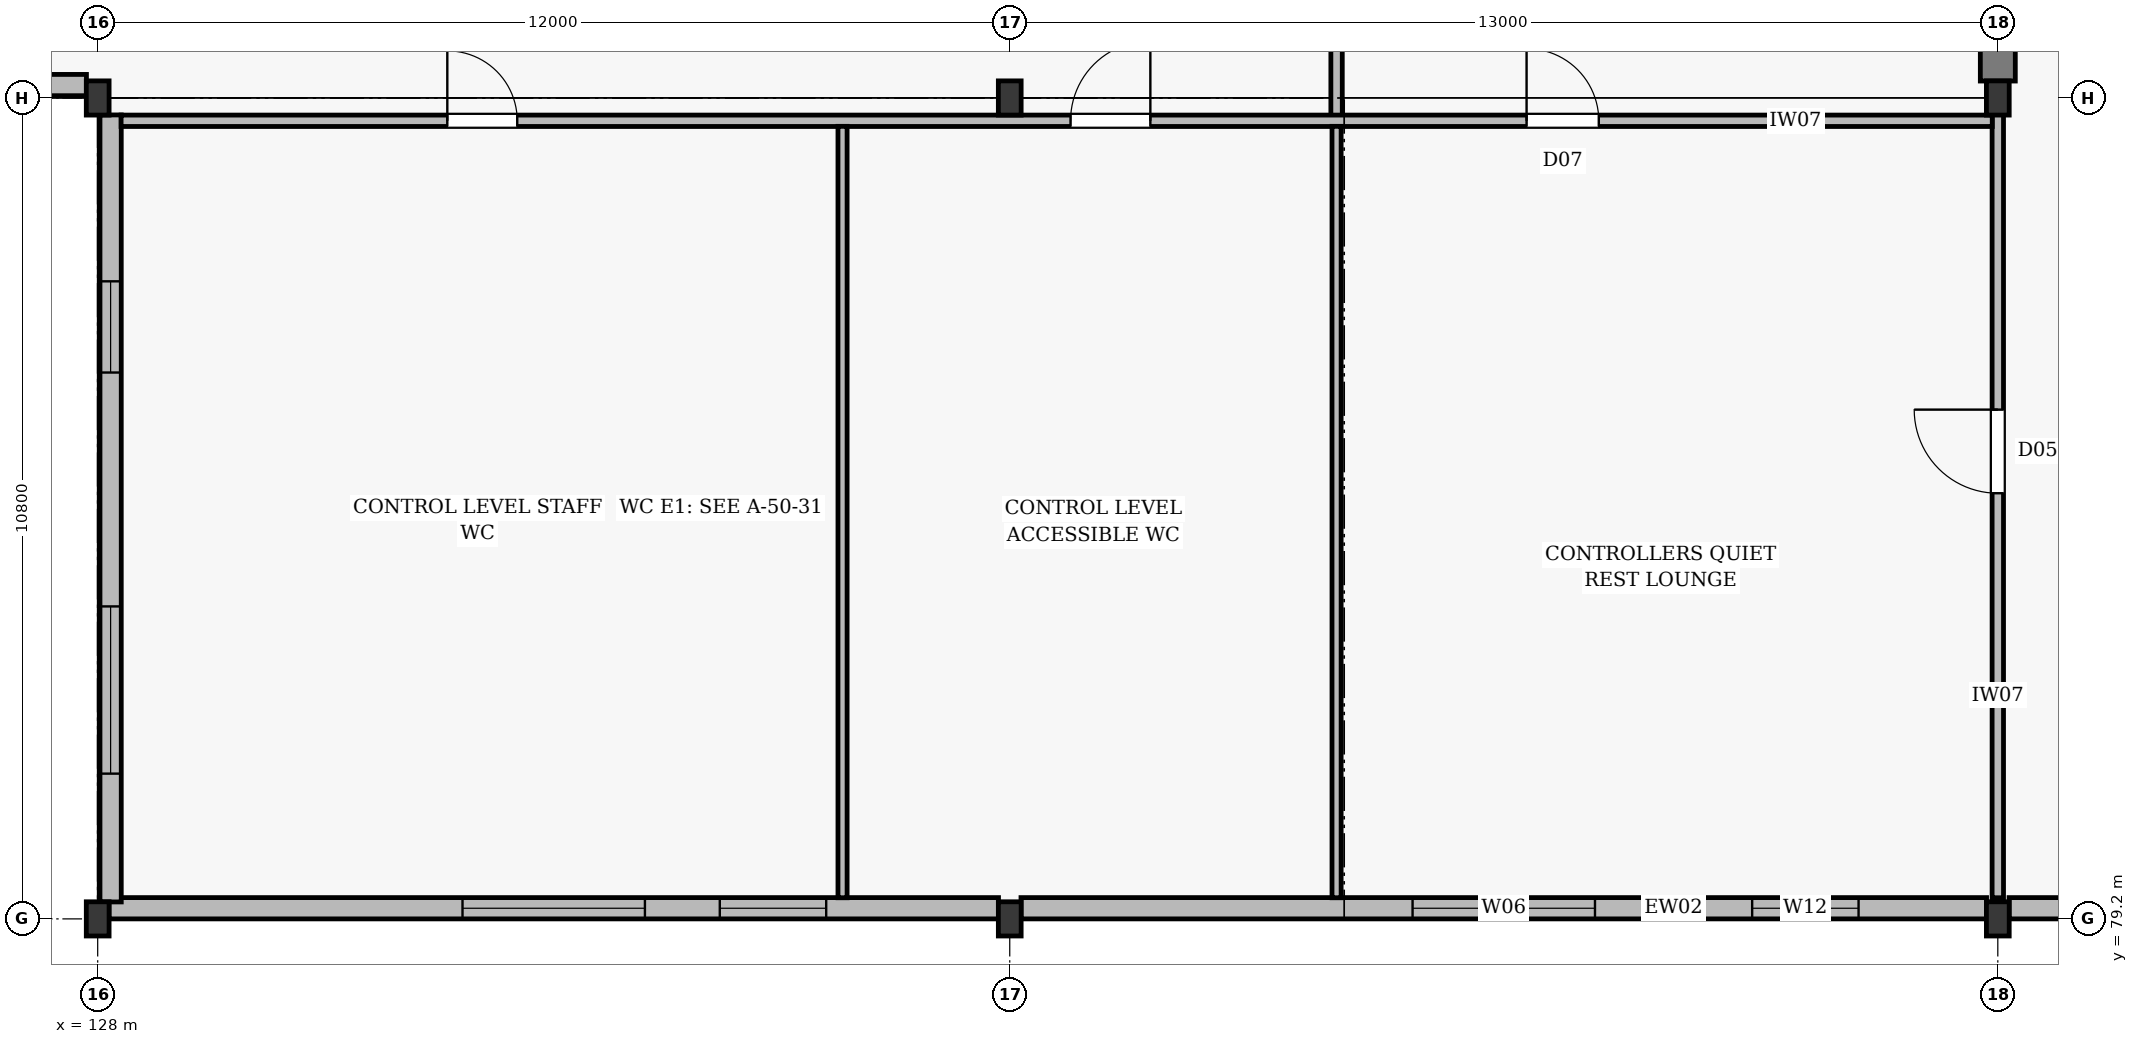
"""IFC4 building model, lengths in metres.
Left out: names, types, materials, properties, quantities, classifications, styles, units other than length and angle.
Written with IfcOpenShell. Run it as: python <this file> out.ifc"""

import sys

from ifc_helpers import new_model, si_unit, direction, frame, frame_2d, origin, origin_2d, place, context, subcontext, project, spatial, rectangle, i_section, extrude, element, fill, save


model = new_model("IFC4")
c1 = context("Model", 3, precision=1e-05, world=origin(), true_north=direction((0.0, 1.0)))
c2 = subcontext(c1, "Body", "Model", "MODEL_VIEW")
j1 = project(units=[si_unit("LENGTHUNIT", "METRE"), si_unit("PLANEANGLEUNIT", "RADIAN")], contexts=[c1])
p1 = place(None, origin())
s1 = spatial("IfcSite", under=j1, at=p1, CompositionType="ELEMENT")
p2 = place(p1, origin())
s2 = spatial("IfcBuilding", under=s1, at=p2, CompositionType="ELEMENT")
p3 = place(p2, frame((0.0, 0.0, 17.4)))
s3 = spatial("IfcBuildingStorey", under=s2, at=p3, CompositionType="ELEMENT", Elevation=17.4)
for number, where, z_axis, x_axis in (
    (1, (128.0, 79.2, 0.0), (0.0, 0.0, 1.0), (1.0, 0.0, 0.0)),
    (2, (128.0, 90.0, 0.0), (0.0, 0.0, 1.0), (1.0, 0.0, 0.0)),
    (3, (140.0, 79.2, 0.0), (0.0, 0.0, 1.0), (1.0, 0.0, 0.0)),
    (4, (140.0, 90.0, 0.0), (0.0, 0.0, 1.0), (1.0, 0.0, 0.0)),
    (5, (153.0, 79.2, 0.0), (0.0, 0.0, 1.0), (1.0, 0.0, 0.0)),
    (6, (153.0, 90.0, 0.0), (0.0, 0.0, 1.0), (1.0, 0.0, 0.0)),
):
    element("IfcColumn", number, at=place(p3, frame(where, z_axis=z_axis, x_axis=x_axis)), inside=s3, PredefinedType="COLUMN", context=c2, shape_type="SweptSolid", body=[
        extrude(i_section(OverallWidth=0.3, OverallDepth=0.45, WebThickness=0.014, FlangeThickness=0.026, at=origin_2d()), origin(), (0.0, 0.0, 1.0), 3.9),
    ])
p4 = place(p3, frame((153.0, 90.223, 0.0), z_axis=(0.0, 0.0, 1.0), x_axis=(0.0, 1.0, 0.0)))
e7 = element("IfcWall", 7, at=p4, inside=s3, PredefinedType="SHEAR", context=c2, shape_type="SweptSolid", body=[
    extrude(rectangle(XDim=10.354, YDim=0.46, at=frame_2d((5.177, 0.0))), origin(), (0.0, 0.0, 1.0), 3.68),
])
p5 = place(p3, frame((128.148, 79.34, 0.0), z_axis=(0.0, 0.0, 1.0), x_axis=(1.0, 0.0, 0.0)))
e8 = element("IfcWall", 8, at=p5, inside=s3, PredefinedType="STANDARD", context=c2, shape_type="SweptSolid", body=[
    extrude(rectangle(XDim=11.704, YDim=0.28, at=frame_2d((5.852, 0.0))), origin(), (0.0, 0.0, 1.0), 3.18),
])
p6 = place(p5, frame((4.652, 0.0, 0.54)))
e9 = element("IfcOpeningElement", 9, at=p6, cuts=e8, PredefinedType="OPENING", context=c2, shape_type="SweptSolid", body=[
    extrude(rectangle(XDim=2.4, YDim=2.4, at=frame_2d((1.2, 1.2))), frame((0.0, 0.152, 0.0), z_axis=(0.0, -1.0, 0.0), x_axis=(1.0, 0.0, 0.0)), (0.0, 0.0, 1.0), 0.304),
])
p7 = place(p5, frame((8.037, 0.0, 1.05)))
e10 = element("IfcOpeningElement", 10, at=p7, cuts=e8, PredefinedType="OPENING", context=c2, shape_type="SweptSolid", body=[
    extrude(rectangle(XDim=1.4, YDim=1.8, at=frame_2d((0.7, 0.9))), frame((0.0, 0.152, 0.0), z_axis=(0.0, -1.0, 0.0), x_axis=(1.0, 0.0, 0.0)), (0.0, 0.0, 1.0), 0.304),
])
p8 = place(p3, frame((140.148, 79.34, 0.0), z_axis=(0.0, 0.0, 1.0), x_axis=(1.0, 0.0, 0.0)))
e11 = element("IfcWall", 11, at=p8, inside=s3, PredefinedType="STANDARD", context=c2, shape_type="SweptSolid", body=[
    extrude(rectangle(XDim=12.704, YDim=0.28, at=frame_2d((6.352, 0.0))), origin(), (0.0, 0.0, 1.0), 3.12),
])
p9 = place(p8, frame((5.152, 0.0, 0.48)))
e12 = element("IfcOpeningElement", 12, at=p9, cuts=e11, PredefinedType="OPENING", context=c2, shape_type="SweptSolid", body=[
    extrude(rectangle(XDim=2.4, YDim=2.4, at=frame_2d((1.2, 1.2))), frame((0.0, 0.152, 0.0), z_axis=(0.0, -1.0, 0.0), x_axis=(1.0, 0.0, 0.0)), (0.0, 0.0, 1.0), 0.304),
])
p10 = place(p8, frame((9.62, 0.0, 1.05)))
e13 = element("IfcOpeningElement", 13, at=p10, cuts=e11, PredefinedType="OPENING", context=c2, shape_type="SweptSolid", body=[
    extrude(rectangle(XDim=1.4, YDim=1.8, at=frame_2d((0.7, 0.9))), frame((0.0, 0.152, 0.0), z_axis=(0.0, -1.0, 0.0), x_axis=(1.0, 0.0, 0.0)), (0.0, 0.0, 1.0), 0.304),
])
p11 = place(p3, frame((153.148, 79.34, 0.0), z_axis=(0.0, 0.0, 1.0), x_axis=(1.0, 0.0, 0.0)))
e14 = element("IfcWall", 14, at=p11, inside=s3, PredefinedType="STANDARD", context=c2, shape_type="SweptSolid", body=[
    extrude(rectangle(XDim=13.204, YDim=0.28, at=frame_2d((6.602, 0.0))), origin(), (0.0, 0.0, 1.0), 3.12),
])
p12 = place(p11, frame((5.402, 0.0, 0.48)))
e15 = element("IfcOpeningElement", 15, at=p12, cuts=e14, PredefinedType="OPENING", context=c2, shape_type="SweptSolid", body=[
    extrude(rectangle(XDim=2.4, YDim=2.4, at=frame_2d((1.2, 1.2))), frame((0.0, 0.152, 0.0), z_axis=(0.0, -1.0, 0.0), x_axis=(1.0, 0.0, 0.0)), (0.0, 0.0, 1.0), 0.304),
])
p13 = place(p11, frame((10.037, 0.0, 1.05)))
e16 = element("IfcOpeningElement", 16, at=p13, cuts=e14, PredefinedType="OPENING", context=c2, shape_type="SweptSolid", body=[
    extrude(rectangle(XDim=1.4, YDim=1.8, at=frame_2d((0.7, 0.9))), frame((0.0, 0.152, 0.0), z_axis=(0.0, -1.0, 0.0), x_axis=(1.0, 0.0, 0.0)), (0.0, 0.0, 1.0), 0.304),
])
p14 = place(p3, frame((118.148, 90.17, 0.0), z_axis=(0.0, 0.0, 1.0), x_axis=(1.0, 0.0, 0.0)))
e17 = element("IfcWall", 17, at=p14, inside=s3, PredefinedType="STANDARD", context=c2, shape_type="SweptSolid", body=[
    extrude(rectangle(XDim=9.704, YDim=0.28, at=frame_2d((4.852, 0.0))), origin(), (0.0, 0.0, 1.0), 3.22),
])
p15 = place(p14, frame((5.878, 0.0, 0.58)))
e18 = element("IfcOpeningElement", 18, at=p15, cuts=e17, PredefinedType="OPENING", context=c2, shape_type="SweptSolid", body=[
    extrude(rectangle(XDim=2.4, YDim=2.4, at=frame_2d((1.2, 1.2))), frame((0.0, 0.152, 0.0), z_axis=(0.0, -1.0, 0.0), x_axis=(1.0, 0.0, 0.0)), (0.0, 0.0, 1.0), 0.304),
])
p16 = place(p3, frame((128.17, 79.423, 0.0), z_axis=(0.0, 0.0, 1.0), x_axis=(0.0, 1.0, 0.0)))
e19 = element("IfcWall", 19, at=p16, inside=s3, PredefinedType="STANDARD", context=c2, shape_type="SweptSolid", body=[
    extrude(rectangle(XDim=10.354, YDim=0.28, at=frame_2d((5.177, 0.0))), origin(), (0.0, 0.0, 1.0), 3.22),
])
p17 = place(p16, frame((1.688, 0.0, 0.75)))
e20 = element("IfcOpeningElement", 20, at=p17, cuts=e19, PredefinedType="OPENING", context=c2, shape_type="SweptSolid", body=[
    extrude(rectangle(XDim=2.2, YDim=2.2, at=frame_2d((1.1, 1.1))), frame((0.0, 0.152, 0.0), z_axis=(0.0, -1.0, 0.0), x_axis=(1.0, 0.0, 0.0)), (0.0, 0.0, 1.0), 0.304),
])
p18 = place(p16, frame((6.965, 0.0, 1.05)))
e21 = element("IfcOpeningElement", 21, at=p18, cuts=e19, PredefinedType="OPENING", context=c2, shape_type="SweptSolid", body=[
    extrude(rectangle(XDim=1.2, YDim=0.9, at=frame_2d((0.6, 0.45))), frame((0.0, 0.152, 0.0), z_axis=(0.0, -1.0, 0.0), x_axis=(1.0, 0.0, 0.0)), (0.0, 0.0, 1.0), 0.304),
])
p19 = place(p3, frame((144.3, 89.7, 0.0), z_axis=(0.0, 0.0, 1.0), x_axis=(0.0, 1.0, 0.0)))
e22 = element("IfcWall", 22, at=p19, inside=s3, PredefinedType="PARTITIONING", context=c2, shape_type="SweptSolid", body=[
    extrude(rectangle(XDim=15.2, YDim=0.15, at=frame_2d((7.6, 0.0))), origin(), (0.0, 0.0, 1.0), 3.12),
])
p20 = place(p19, frame((6.0, 0.0, 0.005)))
e23 = element("IfcOpeningElement", 23, at=p20, cuts=e22, PredefinedType="OPENING", context=c2, shape_type="SweptSolid", body=[
    extrude(rectangle(XDim=1.1, YDim=2.1, at=frame_2d((0.55, 1.05))), frame((0.0, 0.087, 0.0), z_axis=(0.0, -1.0, 0.0), x_axis=(1.0, 0.0, 0.0)), (0.0, 0.0, 1.0), 0.174),
])
p21 = place(p3, frame((153.0, 79.478, 0.0), z_axis=(0.0, 0.0, 1.0), x_axis=(0.0, 1.0, 0.0)))
e24 = element("IfcWall", 24, at=p21, inside=s3, PredefinedType="PARTITIONING", context=c2, shape_type="SweptSolid", body=[
    extrude(rectangle(XDim=10.522, YDim=0.15, at=frame_2d((5.261, 0.0))), origin(), (0.0, 0.0, 1.0), 3.12),
])
p22 = place(p21, frame((5.322, 0.0, 0.005)))
e25 = element("IfcOpeningElement", 25, at=p22, cuts=e24, PredefinedType="OPENING", context=c2, shape_type="SweptSolid", body=[
    extrude(rectangle(XDim=1.1, YDim=2.1, at=frame_2d((0.55, 1.05))), frame((0.0, 0.087, 0.0), z_axis=(0.0, -1.0, 0.0), x_axis=(1.0, 0.0, 0.0)), (0.0, 0.0, 1.0), 0.174),
])
p23 = place(p3, frame((128.308, 89.7, 0.0), z_axis=(0.0, 0.0, 1.0), x_axis=(1.0, 0.0, 0.0)))
e26 = element("IfcWall", 26, at=p23, inside=s3, PredefinedType="PARTITIONING", context=c2, shape_type="SweptSolid", body=[
    extrude(rectangle(XDim=24.619, YDim=0.15, at=frame_2d((12.31, 0.0))), origin(), (0.0, 0.0, 1.0), 3.12),
])
p24 = place(p23, frame((4.292, 0.0, 0.005)))
e27 = element("IfcOpeningElement", 27, at=p24, cuts=e26, PredefinedType="OPENING", context=c2, shape_type="SweptSolid", body=[
    extrude(rectangle(XDim=0.92, YDim=2.12, at=frame_2d((0.46, 1.06))), frame((0.0, 0.087, 0.0), z_axis=(0.0, -1.0, 0.0), x_axis=(1.0, 0.0, 0.0)), (0.0, 0.0, 1.0), 0.174),
])
p25 = place(p23, frame((12.492, 0.0, 0.005)))
e28 = element("IfcOpeningElement", 28, at=p25, cuts=e26, PredefinedType="OPENING", context=c2, shape_type="SweptSolid", body=[
    extrude(rectangle(XDim=1.05, YDim=2.15, at=frame_2d((0.525, 1.075))), frame((0.0, 0.087, 0.0), z_axis=(0.0, -1.0, 0.0), x_axis=(1.0, 0.0, 0.0)), (0.0, 0.0, 1.0), 0.174),
])
p26 = place(p23, frame((18.492, 0.0, 0.005)))
e29 = element("IfcOpeningElement", 29, at=p26, cuts=e26, PredefinedType="OPENING", context=c2, shape_type="SweptSolid", body=[
    extrude(rectangle(XDim=0.95, YDim=2.1, at=frame_2d((0.475, 1.05))), frame((0.0, 0.087, 0.0), z_axis=(0.0, -1.0, 0.0), x_axis=(1.0, 0.0, 0.0)), (0.0, 0.0, 1.0), 0.174),
])
p27 = place(p3, frame((137.8, 79.478, 0.0), z_axis=(0.0, 0.0, 1.0), x_axis=(0.0, 1.0, 0.0)))
e30 = element("IfcWall", 30, at=p27, inside=s3, PredefinedType="PARTITIONING", context=c2, shape_type="SweptSolid", body=[
    extrude(rectangle(XDim=10.149, YDim=0.12, at=frame_2d((5.074, 0.0))), origin(), (0.0, 0.0, 1.0), 3.22),
])
p28 = place(p3, frame((144.3, 79.478, 0.0), z_axis=(0.0, 0.0, 1.0), x_axis=(0.0, 1.0, 0.0)))
e31 = element("IfcWall", 31, at=p28, inside=s3, PredefinedType="PARTITIONING", context=c2, shape_type="SweptSolid", body=[
    extrude(rectangle(XDim=10.149, YDim=0.12, at=frame_2d((5.074, 0.0))), origin(), (0.0, 0.0, 1.0), 3.12),
])
p29 = place(p6, origin())
e32 = element("IfcWindow", 32, at=p29, inside=s3, PartitioningType="DOUBLE_PANEL_VERTICAL", PredefinedType="WINDOW", context=c2, shape_type="SweptSolid", body=[
    extrude(rectangle(XDim=2.4, YDim=2.4, at=frame_2d((1.2, 1.2))), frame((0.0, 0.03, 0.0), z_axis=(0.0, -1.0, 0.0), x_axis=(1.0, 0.0, 0.0)), (0.0, 0.0, 1.0), 0.06),
])
fill(e9, e32)
p30 = place(p7, origin())
e33 = element("IfcWindow", 33, at=p30, inside=s3, PartitioningType="DOUBLE_PANEL_VERTICAL", PredefinedType="WINDOW", context=c2, shape_type="SweptSolid", body=[
    extrude(rectangle(XDim=1.4, YDim=1.8, at=frame_2d((0.7, 0.9))), frame((0.0, 0.03, 0.0), z_axis=(0.0, -1.0, 0.0), x_axis=(1.0, 0.0, 0.0)), (0.0, 0.0, 1.0), 0.06),
])
fill(e10, e33)
p31 = place(p9, origin())
e34 = element("IfcWindow", 34, at=p31, inside=s3, PartitioningType="DOUBLE_PANEL_VERTICAL", PredefinedType="WINDOW", context=c2, shape_type="SweptSolid", body=[
    extrude(rectangle(XDim=2.4, YDim=2.4, at=frame_2d((1.2, 1.2))), frame((0.0, 0.03, 0.0), z_axis=(0.0, -1.0, 0.0), x_axis=(1.0, 0.0, 0.0)), (0.0, 0.0, 1.0), 0.06),
])
fill(e12, e34)
p32 = place(p10, origin())
e35 = element("IfcWindow", 35, at=p32, inside=s3, PartitioningType="DOUBLE_PANEL_VERTICAL", PredefinedType="WINDOW", context=c2, shape_type="SweptSolid", body=[
    extrude(rectangle(XDim=1.4, YDim=1.8, at=frame_2d((0.7, 0.9))), frame((0.0, 0.03, 0.0), z_axis=(0.0, -1.0, 0.0), x_axis=(1.0, 0.0, 0.0)), (0.0, 0.0, 1.0), 0.06),
])
fill(e13, e35)
p33 = place(p17, origin())
e36 = element("IfcWindow", 36, at=p33, inside=s3, PartitioningType="DOUBLE_PANEL_VERTICAL", PredefinedType="WINDOW", context=c2, shape_type="SweptSolid", body=[
    extrude(rectangle(XDim=2.2, YDim=2.2, at=frame_2d((1.1, 1.1))), frame((0.0, 0.03, 0.0), z_axis=(0.0, -1.0, 0.0), x_axis=(1.0, 0.0, 0.0)), (0.0, 0.0, 1.0), 0.06),
])
fill(e20, e36)
p34 = place(p18, origin())
e37 = element("IfcWindow", 37, at=p34, inside=s3, PartitioningType="DOUBLE_PANEL_VERTICAL", PredefinedType="WINDOW", context=c2, shape_type="SweptSolid", body=[
    extrude(rectangle(XDim=1.2, YDim=0.9, at=frame_2d((0.6, 0.45))), frame((0.0, 0.03, 0.0), z_axis=(0.0, -1.0, 0.0), x_axis=(1.0, 0.0, 0.0)), (0.0, 0.0, 1.0), 0.06),
])
fill(e21, e37)
p35 = place(p22, origin())
e38 = element("IfcDoor", 38, at=p35, inside=s3, OperationType="SINGLE_SWING_RIGHT", PredefinedType="DOOR", context=c2, shape_type="SweptSolid", body=[
    extrude(rectangle(XDim=1.1, YDim=2.1, at=frame_2d((0.55, 1.05))), frame((0.0, 0.025, 0.0), z_axis=(0.0, -1.0, 0.0), x_axis=(1.0, 0.0, 0.0)), (0.0, 0.0, 1.0), 0.05),
])
fill(e25, e38)
p36 = place(p24, origin())
e39 = element("IfcDoor", 39, at=p36, inside=s3, OperationType="SINGLE_SWING_LEFT", PredefinedType="DOOR", context=c2, shape_type="SweptSolid", body=[
    extrude(rectangle(XDim=0.92, YDim=2.12, at=frame_2d((0.46, 1.06))), frame((0.0, 0.025, 0.0), z_axis=(0.0, -1.0, 0.0), x_axis=(1.0, 0.0, 0.0)), (0.0, 0.0, 1.0), 0.05),
])
fill(e27, e39)
p37 = place(p25, origin())
e40 = element("IfcDoor", 40, at=p37, inside=s3, OperationType="SINGLE_SWING_RIGHT", PredefinedType="DOOR", context=c2, shape_type="SweptSolid", body=[
    extrude(rectangle(XDim=1.05, YDim=2.15, at=frame_2d((0.525, 1.075))), frame((0.0, 0.025, 0.0), z_axis=(0.0, -1.0, 0.0), x_axis=(1.0, 0.0, 0.0)), (0.0, 0.0, 1.0), 0.05),
])
fill(e28, e40)
p38 = place(p26, origin())
e41 = element("IfcDoor", 41, at=p38, inside=s3, OperationType="SINGLE_SWING_LEFT", PredefinedType="DOOR", context=c2, shape_type="SweptSolid", body=[
    extrude(rectangle(XDim=0.95, YDim=2.1, at=frame_2d((0.475, 1.05))), frame((0.0, 0.025, 0.0), z_axis=(0.0, -1.0, 0.0), x_axis=(1.0, 0.0, 0.0)), (0.0, 0.0, 1.0), 0.05),
])
fill(e29, e41)
save(model, sys.argv[1])
